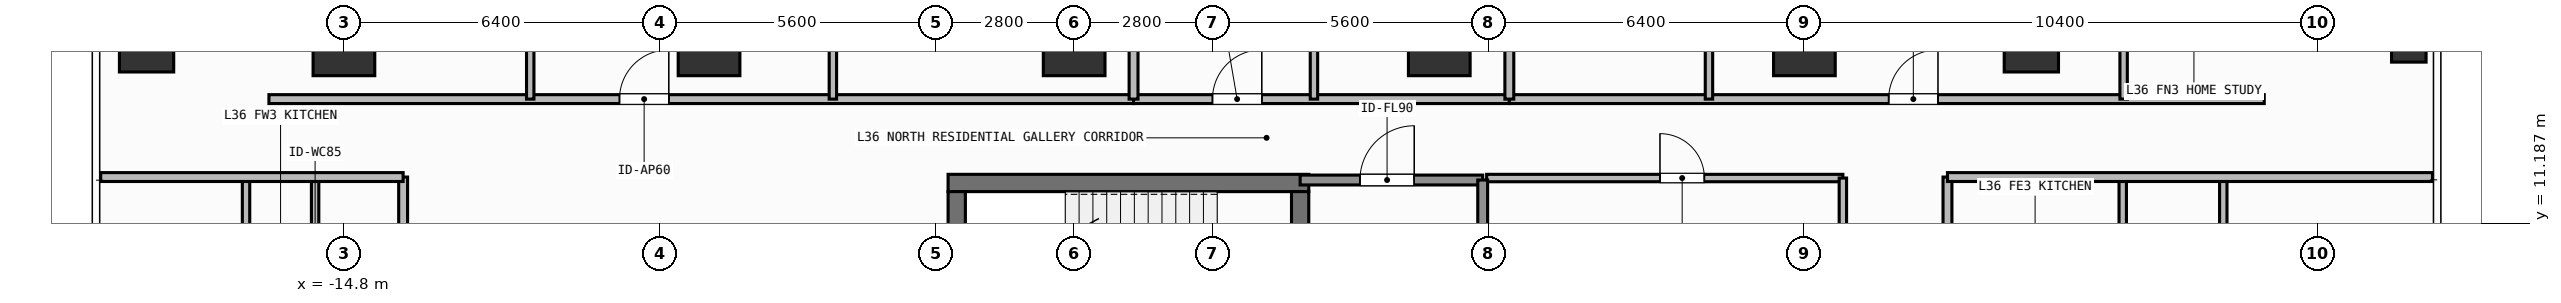
"""IFC4 building model, lengths in metres.
Left out: names, types, materials, properties, quantities, classifications, styles, units other than length and angle.
Written with IfcOpenShell. Run it as: python <this file> out.ifc"""

import sys

from ifc_helpers import new_model, si_unit, direction, frame, frame_2d, origin, origin_2d, place, context, subcontext, project, spatial, rectangle, hollow_rectangle, extrude, element, fill, save


model = new_model("IFC4")
c1 = context("Model", 3, precision=1e-05, world=origin(), true_north=direction((0.0, 1.0)))
c2 = subcontext(c1, "Body", "Model", "MODEL_VIEW")
j1 = project(units=[si_unit("LENGTHUNIT", "METRE"), si_unit("PLANEANGLEUNIT", "RADIAN")], contexts=[c1])
p1 = place(None, origin())
s1 = spatial("IfcSite", under=j1, at=p1, CompositionType="ELEMENT")
p2 = place(p1, origin())
s2 = spatial("IfcBuilding", under=s1, at=p2, CompositionType="ELEMENT")
p3 = place(p2, frame((0.0, 0.0, 144.6)))
s3 = spatial("IfcBuildingStorey", under=s2, at=p3, CompositionType="ELEMENT", Elevation=144.6)
p4 = place(p3, frame((-2.555, 12.0, 0.0), z_axis=(0.0, 0.0, 1.0), x_axis=(1.0, 0.0, 0.0)))
e1 = element("IfcWall", 1, at=p4, inside=s3, PredefinedType="SHEAR", context=c2, shape_type="SweptSolid", body=[
    extrude(rectangle(XDim=7.31, YDim=0.35, at=frame_2d((3.655, 0.0))), origin(), (0.0, 0.0, 1.0), 3.9),
])
p5 = place(p3, frame((-2.38, 8.9, 0.0), z_axis=(0.0, 0.0, 1.0), x_axis=(0.0, 1.0, 0.0)))
e2 = element("IfcWall", 2, at=p5, inside=s3, PredefinedType="SHEAR", context=c2, shape_type="SweptSolid", body=[
    extrude(rectangle(XDim=2.925, YDim=0.35, at=frame_2d((1.462, 0.0))), origin(), (0.0, 0.0, 1.0), 3.9),
])
p6 = place(p3, frame((4.58, 11.825, 0.0), z_axis=(0.0, 0.0, 1.0), x_axis=(0.0, -1.0, 0.0)))
e3 = element("IfcWall", 3, at=p6, inside=s3, PredefinedType="SHEAR", context=c2, shape_type="SweptSolid", body=[
    extrude(rectangle(XDim=2.925, YDim=0.35, at=frame_2d((1.462, 0.0))), origin(), (0.0, 0.0, 1.0), 3.9),
])
p7 = place(p6, frame((0.913, 0.0, 0.0)))
e4 = element("IfcOpeningElement", 4, at=p7, cuts=e3, PredefinedType="OPENING", context=c2, shape_type="SweptSolid", body=[
    extrude(rectangle(XDim=1.1, YDim=2.15, at=frame_2d((0.55, 1.075))), frame((0.0, 0.185, 0.0), z_axis=(0.0, -1.0, 0.0), x_axis=(1.0, 0.0, 0.0)), (0.0, 0.0, 1.0), 0.37),
])
for number, where, z_axis, x_axis in (
    (5, (-14.8, 14.8, 0.0), (0.0, 0.0, 1.0), (1.0, 0.0, 0.0)),
    (6, (-7.4, 14.8, 0.0), (0.0, 0.0, 1.0), (1.0, 0.0, 0.0)),
    (7, (0.0, 14.8, 0.0), (0.0, 0.0, 1.0), (1.0, 0.0, 0.0)),
    (8, (7.4, 14.8, 0.0), (0.0, 0.0, 1.0), (1.0, 0.0, 0.0)),
    (9, (14.8, 14.8, 0.0), (0.0, 0.0, 1.0), (1.0, 0.0, 0.0)),
):
    element("IfcColumn", number, at=place(p3, frame(where, z_axis=z_axis, x_axis=x_axis)), inside=s3, PredefinedType="COLUMN", context=c2, shape_type="SweptSolid", body=[
        extrude(rectangle(XDim=1.25, YDim=1.25, at=origin_2d()), origin(), (0.0, 0.0, 1.0), 3.9),
    ])
for number, where, z_axis, x_axis in (
    (10, (-18.8, 14.8, 0.0), (0.0, 0.0, 1.0), (1.0, 0.0, 0.0)),
    (11, (19.4, 14.8, 0.0), (0.0, 0.0, 1.0), (1.0, 0.0, 0.0)),
):
    element("IfcColumn", number, at=place(p3, frame(where, z_axis=z_axis, x_axis=x_axis)), inside=s3, PredefinedType="COLUMN", context=c2, shape_type="SweptSolid", body=[
        extrude(rectangle(XDim=1.1, YDim=1.1, at=origin_2d()), origin(), (0.0, 0.0, 1.0), 3.9),
    ])
p8 = place(p3, frame((27.05, 14.8, 0.0), z_axis=(0.0, 0.0, 1.0), x_axis=(1.0, 0.0, 0.0)))
e12 = element("IfcColumn", 12, at=p8, inside=s3, PredefinedType="COLUMN", context=c2, shape_type="SweptSolid", body=[
    extrude(hollow_rectangle(XDim=0.7, YDim=0.7, WallThickness=0.032, at=origin_2d()), origin(), (0.0, 0.0, 1.0), 3.9),
])
p9 = place(p3, frame((4.58, 12.06, 0.0), z_axis=(0.0, 0.0, 1.0), x_axis=(1.0, 0.0, 0.0)))
e13 = element("IfcWall", 13, at=p9, inside=s3, PredefinedType="SOLIDWALL", context=c2, shape_type="SweptSolid", body=[
    extrude(rectangle(XDim=3.7, YDim=0.2, at=frame_2d((1.85, 0.0))), origin(), (0.0, 0.0, 1.0), 3.68),
])
p10 = place(p9, frame((1.212, 0.0, 0.0)))
e14 = element("IfcOpeningElement", 14, at=p10, cuts=e13, PredefinedType="OPENING", context=c2, shape_type="SweptSolid", body=[
    extrude(rectangle(XDim=1.1, YDim=2.15, at=frame_2d((0.55, 1.075))), frame((0.0, 0.11, 0.0), z_axis=(0.0, -1.0, 0.0), x_axis=(1.0, 0.0, 0.0)), (0.0, 0.0, 1.0), 0.22),
])
p11 = place(p3, frame((8.36, 12.1, 0.0), z_axis=(0.0, 0.0, 1.0), x_axis=(1.0, 0.0, 0.0)))
e15 = element("IfcWall", 15, at=p11, inside=s3, PredefinedType="PARTITIONING", context=c2, shape_type="SweptSolid", body=[
    extrude(rectangle(XDim=7.22, YDim=0.15, at=frame_2d((3.61, 0.0))), origin(), (0.0, 0.0, 1.0), 3.68),
])
p12 = place(p11, frame((3.513, 0.0, 0.0)))
e16 = element("IfcOpeningElement", 16, at=p12, cuts=e15, PredefinedType="OPENING", context=c2, shape_type="SweptSolid", body=[
    extrude(rectangle(XDim=0.9, YDim=2.1, at=frame_2d((0.45, 1.05))), frame((0.0, 0.085, 0.0), z_axis=(0.0, -1.0, 0.0), x_axis=(1.0, 0.0, 0.0)), (0.0, 0.0, 1.0), 0.17),
])
p13 = place(p3, frame((-16.32, 13.7, 0.0), z_axis=(0.0, 0.0, 1.0), x_axis=(1.0, 0.0, 0.0)))
e17 = element("IfcWall", 17, at=p13, inside=s3, PredefinedType="PARTITIONING", context=c2, shape_type="SweptSolid", body=[
    extrude(rectangle(XDim=17.524, YDim=0.18, at=frame_2d((8.762, 0.0))), origin(), (0.0, 0.0, 1.0), 3.68),
])
p14 = place(p13, frame((7.104, 0.0, 0.0)))
e18 = element("IfcOpeningElement", 18, at=p14, cuts=e17, PredefinedType="OPENING", context=c2, shape_type="SweptSolid", body=[
    extrude(rectangle(XDim=1.0, YDim=2.2, at=frame_2d((0.5, 1.1))), frame((0.0, 0.1, 0.0), z_axis=(0.0, -1.0, 0.0), x_axis=(1.0, 0.0, 0.0)), (0.0, 0.0, 1.0), 0.2),
])
p15 = place(p3, frame((-11.024, 13.7, 0.0), z_axis=(0.0, 0.0, 1.0), x_axis=(0.0, 1.0, 0.0)))
e19 = element("IfcWall", 19, at=p15, inside=s3, PredefinedType="PARTITIONING", context=c2, shape_type="SweptSolid", body=[
    extrude(rectangle(XDim=5.69, YDim=0.15, at=frame_2d((2.845, 0.0))), origin(), (0.0, 0.0, 1.0), 3.68),
])
p16 = place(p15, frame((2.42, 0.0, 0.0)))
e20 = element("IfcOpeningElement", 20, at=p16, cuts=e19, PredefinedType="OPENING", context=c2, shape_type="SweptSolid", body=[
    extrude(rectangle(XDim=0.85, YDim=2.1, at=frame_2d((0.425, 1.05))), frame((0.0, 0.085, 0.0), z_axis=(0.0, -1.0, 0.0), x_axis=(1.0, 0.0, 0.0)), (0.0, 0.0, 1.0), 0.17),
])
p17 = place(p3, frame((-4.89, 13.7, 0.0), z_axis=(0.0, 0.0, 1.0), x_axis=(0.0, 1.0, 0.0)))
e21 = element("IfcWall", 21, at=p17, inside=s3, PredefinedType="PARTITIONING", context=c2, shape_type="SweptSolid", body=[
    extrude(rectangle(XDim=3.983, YDim=0.15, at=frame_2d((1.992, 0.0))), origin(), (0.0, 0.0, 1.0), 3.68),
])
p18 = place(p17, frame((1.566, 0.0, 0.0)))
e22 = element("IfcOpeningElement", 22, at=p18, cuts=e21, PredefinedType="OPENING", context=c2, shape_type="SweptSolid", body=[
    extrude(rectangle(XDim=0.85, YDim=2.1, at=frame_2d((0.425, 1.05))), frame((0.0, 0.085, 0.0), z_axis=(0.0, -1.0, 0.0), x_axis=(1.0, 0.0, 0.0)), (0.0, 0.0, 1.0), 0.17),
])
p19 = place(p3, frame((1.204, 13.7, 0.0), z_axis=(0.0, 0.0, 1.0), x_axis=(1.0, 0.0, 0.0)))
e23 = element("IfcWall", 23, at=p19, inside=s3, PredefinedType="PARTITIONING", context=c2, shape_type="SweptSolid", body=[
    extrude(rectangle(XDim=7.616, YDim=0.18, at=frame_2d((3.808, 0.0))), origin(), (0.0, 0.0, 1.0), 3.68),
])
p20 = place(p19, frame((1.599, 0.0, 0.0)))
e24 = element("IfcOpeningElement", 24, at=p20, cuts=e23, PredefinedType="OPENING", context=c2, shape_type="SweptSolid", body=[
    extrude(rectangle(XDim=1.0, YDim=2.2, at=frame_2d((0.5, 1.1))), frame((0.0, 0.1, 0.0), z_axis=(0.0, -1.0, 0.0), x_axis=(1.0, 0.0, 0.0)), (0.0, 0.0, 1.0), 0.2),
])
p21 = place(p3, frame((4.86, 13.7, 0.0), z_axis=(0.0, 0.0, 1.0), x_axis=(0.0, 1.0, 0.0)))
e25 = element("IfcWall", 25, at=p21, inside=s3, PredefinedType="PARTITIONING", context=c2, shape_type="SweptSolid", body=[
    extrude(rectangle(XDim=3.129, YDim=0.15, at=frame_2d((1.564, 0.0))), origin(), (0.0, 0.0, 1.0), 3.68),
])
p22 = place(p21, frame((1.229, 0.0, 0.0)))
e26 = element("IfcOpeningElement", 26, at=p22, cuts=e25, PredefinedType="OPENING", context=c2, shape_type="SweptSolid", body=[
    extrude(rectangle(XDim=0.85, YDim=2.1, at=frame_2d((0.425, 1.05))), frame((0.0, 0.085, 0.0), z_axis=(0.0, -1.0, 0.0), x_axis=(1.0, 0.0, 0.0)), (0.0, 0.0, 1.0), 0.17),
])
p23 = place(p3, frame((8.82, 13.7, 0.0), z_axis=(0.0, 0.0, 1.0), x_axis=(1.0, 0.0, 0.0)))
e27 = element("IfcWall", 27, at=p23, inside=s3, PredefinedType="PARTITIONING", context=c2, shape_type="SweptSolid", body=[
    extrude(rectangle(XDim=15.3, YDim=0.18, at=frame_2d((7.65, 0.0))), origin(), (0.0, 0.0, 1.0), 3.68),
])
p24 = place(p23, frame((7.688, 0.0, 0.0)))
e28 = element("IfcOpeningElement", 28, at=p24, cuts=e27, PredefinedType="OPENING", context=c2, shape_type="SweptSolid", body=[
    extrude(rectangle(XDim=1.0, YDim=2.2, at=frame_2d((0.5, 1.1))), frame((0.0, 0.1, 0.0), z_axis=(0.0, -1.0, 0.0), x_axis=(1.0, 0.0, 0.0)), (0.0, 0.0, 1.0), 0.2),
])
p25 = place(p3, frame((12.866, 13.7, 0.0), z_axis=(0.0, 0.0, 1.0), x_axis=(0.0, 1.0, 0.0)))
e29 = element("IfcWall", 29, at=p25, inside=s3, PredefinedType="PARTITIONING", context=c2, shape_type="SweptSolid", body=[
    extrude(rectangle(XDim=5.755, YDim=0.15, at=frame_2d((2.877, 0.0))), origin(), (0.0, 0.0, 1.0), 3.68),
])
p26 = place(p25, frame((2.452, 0.0, 0.0)))
e30 = element("IfcOpeningElement", 30, at=p26, cuts=e29, PredefinedType="OPENING", context=c2, shape_type="SweptSolid", body=[
    extrude(rectangle(XDim=0.85, YDim=2.1, at=frame_2d((0.425, 1.05))), frame((0.0, 0.085, 0.0), z_axis=(0.0, -1.0, 0.0), x_axis=(1.0, 0.0, 0.0)), (0.0, 0.0, 1.0), 0.17),
])
p27 = place(p3, frame((21.27, 13.7, 0.0), z_axis=(0.0, 0.0, 1.0), x_axis=(0.0, 1.0, 0.0)))
e31 = element("IfcWall", 31, at=p27, inside=s3, PredefinedType="PARTITIONING", context=c2, shape_type="SweptSolid", body=[
    extrude(rectangle(XDim=3.223, YDim=0.15, at=frame_2d((1.612, 0.0))), origin(), (0.0, 0.0, 1.0), 3.68),
])
p28 = place(p27, frame((1.7, 0.0, 0.0)))
e32 = element("IfcOpeningElement", 32, at=p28, cuts=e31, PredefinedType="OPENING", context=c2, shape_type="SweptSolid", body=[
    extrude(rectangle(XDim=0.85, YDim=2.1, at=frame_2d((0.425, 1.05))), frame((0.0, 0.085, 0.0), z_axis=(0.0, -1.0, 0.0), x_axis=(1.0, 0.0, 0.0)), (0.0, 0.0, 1.0), 0.17),
])
p29 = place(p3, frame((-13.6, 4.04, 0.0), z_axis=(0.0, 0.0, 1.0), x_axis=(0.0, 1.0, 0.0)))
e33 = element("IfcWall", 33, at=p29, inside=s3, PredefinedType="PARTITIONING", context=c2, shape_type="SweptSolid", body=[
    extrude(rectangle(XDim=8.08, YDim=0.18, at=frame_2d((4.04, 0.0))), origin(), (0.0, 0.0, 1.0), 3.68),
])
p30 = place(p29, frame((1.583, 0.0, 0.0)))
e34 = element("IfcOpeningElement", 34, at=p30, cuts=e33, PredefinedType="OPENING", context=c2, shape_type="SweptSolid", body=[
    extrude(rectangle(XDim=1.0, YDim=2.2, at=frame_2d((0.5, 1.1))), frame((0.0, 0.1, 0.0), z_axis=(0.0, -1.0, 0.0), x_axis=(1.0, 0.0, 0.0)), (0.0, 0.0, 1.0), 0.2),
])
p31 = place(p3, frame((17.7, 4.04, 0.0), z_axis=(0.0, 0.0, 1.0), x_axis=(0.0, 1.0, 0.0)))
e35 = element("IfcWall", 35, at=p31, inside=s3, PredefinedType="PARTITIONING", context=c2, shape_type="SweptSolid", body=[
    extrude(rectangle(XDim=8.08, YDim=0.18, at=frame_2d((4.04, 0.0))), origin(), (0.0, 0.0, 1.0), 3.68),
])
p32 = place(p31, frame((1.761, 0.0, 0.0)))
e36 = element("IfcOpeningElement", 36, at=p32, cuts=e35, PredefinedType="OPENING", context=c2, shape_type="SweptSolid", body=[
    extrude(rectangle(XDim=1.0, YDim=2.2, at=frame_2d((0.5, 1.1))), frame((0.0, 0.1, 0.0), z_axis=(0.0, -1.0, 0.0), x_axis=(1.0, 0.0, 0.0)), (0.0, 0.0, 1.0), 0.2),
])
p33 = place(p3, frame((8.28, 8.875, 0.0), z_axis=(0.0, 0.0, 1.0), x_axis=(0.0, 1.0, 0.0)))
e37 = element("IfcWall", 37, at=p33, inside=s3, PredefinedType="SOLIDWALL", context=c2, shape_type="SweptSolid", body=[
    extrude(rectangle(XDim=3.185, YDim=0.2, at=frame_2d((1.593, 0.0))), origin(), (0.0, 0.0, 1.0), 3.68),
])
p34 = place(p3, frame((15.58, 5.85, 0.0), z_axis=(0.0, 0.0, 1.0), x_axis=(0.0, 1.0, 0.0)))
e38 = element("IfcWall", 38, at=p34, inside=s3, PredefinedType="PARTITIONING", context=c2, shape_type="SweptSolid", body=[
    extrude(rectangle(XDim=6.25, YDim=0.15, at=frame_2d((3.125, 0.0))), origin(), (0.0, 0.0, 1.0), 3.68),
])
for number, where, z_axis, x_axis in (
    (39, (1.204, 13.7, 0.0), (0.0, 0.0, 1.0), (0.0, 1.0, 0.0)),
    (40, (8.82, 13.7, 0.0), (0.0, 0.0, 1.0), (0.0, 1.0, 0.0)),
):
    element("IfcWall", number, at=place(p3, frame(where, z_axis=z_axis, x_axis=x_axis)), inside=s3, PredefinedType="PARTITIONING", context=c2, shape_type="SweptSolid", body=[
        extrude(rectangle(XDim=9.93, YDim=0.18, at=frame_2d((4.965, 0.0))), origin(), (0.0, 0.0, 1.0), 3.68),
    ])
p35 = place(p3, frame((-15.384, 8.394, 0.0), z_axis=(0.0, 0.0, 1.0), x_axis=(0.0, 1.0, 0.0)))
e41 = element("IfcWall", 41, at=p35, inside=s3, PredefinedType="PARTITIONING", context=c2, shape_type="SweptSolid", body=[
    extrude(rectangle(XDim=3.726, YDim=0.15, at=frame_2d((1.863, 0.0))), origin(), (0.0, 0.0, 1.0), 3.68),
])
p36 = place(p35, frame((1.353, 0.0, 0.0)))
e42 = element("IfcOpeningElement", 42, at=p36, cuts=e41, PredefinedType="OPENING", context=c2, shape_type="SweptSolid", body=[
    extrude(rectangle(XDim=0.85, YDim=2.1, at=frame_2d((0.425, 1.05))), frame((0.0, 0.085, 0.0), z_axis=(0.0, -1.0, 0.0), x_axis=(1.0, 0.0, 0.0)), (0.0, 0.0, 1.0), 0.17),
])
p37 = place(p3, frame((-16.784, 8.394, 0.0), z_axis=(0.0, 0.0, 1.0), x_axis=(0.0, 1.0, 0.0)))
e43 = element("IfcWall", 43, at=p37, inside=s3, PredefinedType="PARTITIONING", context=c2, shape_type="SweptSolid", body=[
    extrude(rectangle(XDim=3.726, YDim=0.15, at=frame_2d((1.863, 0.0))), origin(), (0.0, 0.0, 1.0), 3.68),
])
p38 = place(p3, frame((-19.73, 12.12, 0.0), z_axis=(0.0, 0.0, 1.0), x_axis=(1.0, 0.0, 0.0)))
e44 = element("IfcWall", 44, at=p38, inside=s3, PredefinedType="PARTITIONING", context=c2, shape_type="SweptSolid", body=[
    extrude(rectangle(XDim=6.13, YDim=0.18, at=frame_2d((3.065, 0.0))), origin(), (0.0, 0.0, 1.0), 3.68),
])
for number, where, z_axis, x_axis in (
    (45, (21.252, 9.32, 0.0), (0.0, 0.0, 1.0), (0.0, 1.0, 0.0)),
    (46, (23.29, 9.32, 0.0), (0.0, 0.0, 1.0), (0.0, 1.0, 0.0)),
):
    element("IfcWall", number, at=place(p3, frame(where, z_axis=z_axis, x_axis=x_axis)), inside=s3, PredefinedType="PARTITIONING", context=c2, shape_type="SweptSolid", body=[
        extrude(rectangle(XDim=2.8, YDim=0.15, at=frame_2d((1.4, 0.0))), origin(), (0.0, 0.0, 1.0), 3.68),
    ])
p39 = place(p3, frame((17.7, 12.12, 0.0), z_axis=(0.0, 0.0, 1.0), x_axis=(1.0, 0.0, 0.0)))
e47 = element("IfcWall", 47, at=p39, inside=s3, PredefinedType="PARTITIONING", context=c2, shape_type="SweptSolid", body=[
    extrude(rectangle(XDim=9.83, YDim=0.18, at=frame_2d((4.915, 0.0))), origin(), (0.0, 0.0, 1.0), 3.68),
])
p40 = place(p10, origin())
e48 = element("IfcDoor", 48, at=p40, inside=s3, OperationType="SINGLE_SWING_RIGHT", PredefinedType="DOOR", context=c2, shape_type="SweptSolid", body=[
    extrude(rectangle(XDim=1.1, YDim=2.15, at=frame_2d((0.55, 1.075))), frame((0.0, 0.025, 0.0), z_axis=(0.0, -1.0, 0.0), x_axis=(1.0, 0.0, 0.0)), (0.0, 0.0, 1.0), 0.05),
])
fill(e14, e48)
p41 = place(p12, origin())
e49 = element("IfcDoor", 49, at=p41, inside=s3, OperationType="SINGLE_SWING_LEFT", PredefinedType="DOOR", context=c2, shape_type="SweptSolid", body=[
    extrude(rectangle(XDim=0.9, YDim=2.1, at=frame_2d((0.45, 1.05))), frame((0.0, 0.025, 0.0), z_axis=(0.0, -1.0, 0.0), x_axis=(1.0, 0.0, 0.0)), (0.0, 0.0, 1.0), 0.05),
])
fill(e16, e49)
p42 = place(p14, origin())
e50 = element("IfcDoor", 50, at=p42, inside=s3, OperationType="SINGLE_SWING_RIGHT", PredefinedType="DOOR", context=c2, shape_type="SweptSolid", body=[
    extrude(rectangle(XDim=1.0, YDim=2.2, at=frame_2d((0.5, 1.1))), frame((0.0, 0.025, 0.0), z_axis=(0.0, -1.0, 0.0), x_axis=(1.0, 0.0, 0.0)), (0.0, 0.0, 1.0), 0.05),
])
fill(e18, e50)
p43 = place(p20, origin())
e51 = element("IfcDoor", 51, at=p43, inside=s3, OperationType="SINGLE_SWING_RIGHT", PredefinedType="DOOR", context=c2, shape_type="SweptSolid", body=[
    extrude(rectangle(XDim=1.0, YDim=2.2, at=frame_2d((0.5, 1.1))), frame((0.0, 0.025, 0.0), z_axis=(0.0, -1.0, 0.0), x_axis=(1.0, 0.0, 0.0)), (0.0, 0.0, 1.0), 0.05),
])
fill(e24, e51)
p44 = place(p24, origin())
e52 = element("IfcDoor", 52, at=p44, inside=s3, OperationType="SINGLE_SWING_RIGHT", PredefinedType="DOOR", context=c2, shape_type="SweptSolid", body=[
    extrude(rectangle(XDim=1.0, YDim=2.2, at=frame_2d((0.5, 1.1))), frame((0.0, 0.025, 0.0), z_axis=(0.0, -1.0, 0.0), x_axis=(1.0, 0.0, 0.0)), (0.0, 0.0, 1.0), 0.05),
])
fill(e28, e52)
save(model, sys.argv[1])
